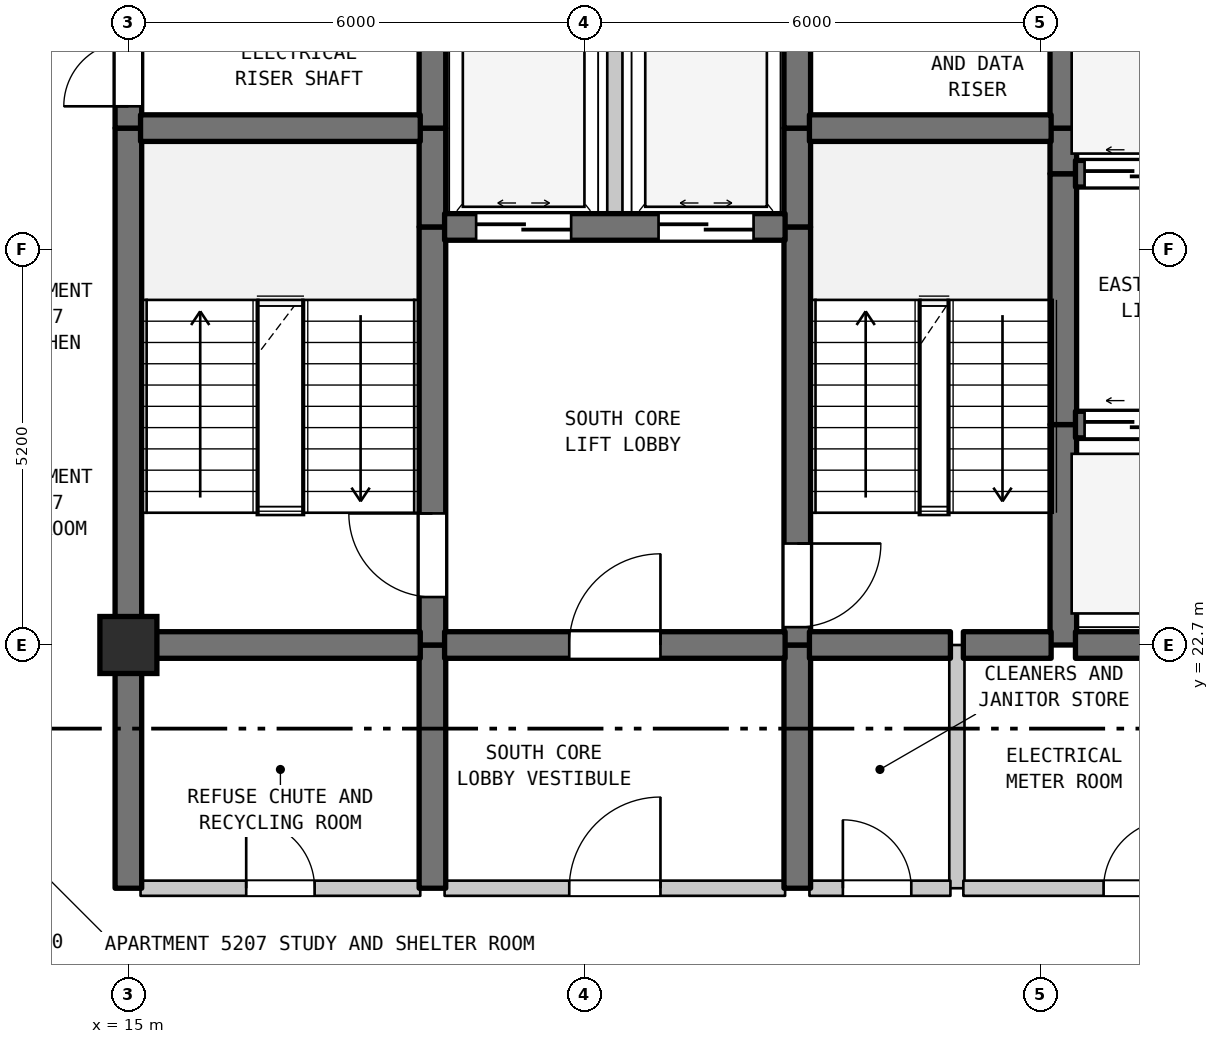
"""IFC4 building model, lengths in metres.
Left out: names, types, materials, properties, quantities, classifications, styles, units other than length and angle.
Written with IfcOpenShell. Run it as: python <this file> out.ifc"""

import sys

from ifc_helpers import new_model, si_unit, direction, frame, frame_2d, origin, origin_2d, place, context, subcontext, project, spatial, rectangle, extrude, element, fill, save


model = new_model("IFC4")
c1 = context("Model", 3, precision=1e-05, world=origin(), true_north=direction((0.0, 1.0)))
c2 = subcontext(c1, "Body", "Model", "MODEL_VIEW")
j1 = project(units=[si_unit("LENGTHUNIT", "METRE"), si_unit("PLANEANGLEUNIT", "RADIAN")], contexts=[c1])
p1 = place(None, origin())
s1 = spatial("IfcSite", under=j1, at=p1, CompositionType="ELEMENT")
p2 = place(p1, origin())
s2 = spatial("IfcBuilding", under=s1, at=p2, CompositionType="ELEMENT")
p3 = place(p2, frame((0.0, 0.0, 210.6)))
s3 = spatial("IfcBuildingStorey", under=s2, at=p3, CompositionType="ELEMENT", Elevation=210.6)
p4 = place(p3, frame((15.0, 22.7, 0.0), z_axis=(0.0, 0.0, 1.0), x_axis=(1.0, 0.0, 0.0)))
e1 = element("IfcColumn", 1, at=p4, inside=s3, PredefinedType="COLUMN", context=c2, shape_type="SweptSolid", body=[
    extrude(rectangle(XDim=0.75, YDim=0.75, at=origin_2d()), origin(), (0.0, 0.0, 1.0), 3.7),
])
p5 = place(p3, frame((15.0, 19.5, 0.0), z_axis=(0.0, 0.0, 1.0), x_axis=(0.0, 1.0, 0.0)))
e2 = element("IfcWall", 2, at=p5, inside=s3, PredefinedType="SHEAR", context=c2, shape_type="SweptSolid", body=[
    extrude(rectangle(XDim=3.2, YDim=0.35, at=frame_2d((1.6, 0.0))), origin(), (0.0, 0.0, 1.0), 3.39),
])
p6 = place(p3, frame((15.0, 22.7, 0.0), z_axis=(0.0, 0.0, 1.0), x_axis=(0.0, 1.0, 0.0)))
e3 = element("IfcWall", 3, at=p6, inside=s3, PredefinedType="SHEAR", context=c2, shape_type="SweptSolid", body=[
    extrude(rectangle(XDim=6.8, YDim=0.35, at=frame_2d((3.4, 0.0))), origin(), (0.0, 0.0, 1.0), 3.39),
])
p7 = place(p3, frame((15.0, 29.5, 0.0), z_axis=(0.0, 0.0, 1.0), x_axis=(0.0, 1.0, 0.0)))
e4 = element("IfcWall", 4, at=p7, inside=s3, PredefinedType="SHEAR", context=c2, shape_type="SweptSolid", body=[
    extrude(rectangle(XDim=1.6, YDim=0.35, at=frame_2d((0.8, 0.0))), origin(), (0.0, 0.0, 1.0), 3.39),
])
p8 = place(p7, frame((0.287, 0.0, 0.0)))
e5 = element("IfcOpeningElement", 5, at=p8, cuts=e4, PredefinedType="OPENING", context=c2, shape_type="SweptSolid", body=[
    extrude(rectangle(XDim=0.85, YDim=2.1, at=frame_2d((0.425, 1.05))), frame((0.0, 0.185, 0.0), z_axis=(0.0, -1.0, 0.0), x_axis=(1.0, 0.0, 0.0)), (0.0, 0.0, 1.0), 0.37),
])
p9 = place(p3, frame((19.0, 19.5, 0.0), z_axis=(0.0, 0.0, 1.0), x_axis=(0.0, 1.0, 0.0)))
e6 = element("IfcWall", 6, at=p9, inside=s3, PredefinedType="SHEAR", context=c2, shape_type="SweptSolid", body=[
    extrude(rectangle(XDim=3.2, YDim=0.35, at=frame_2d((1.6, 0.0))), origin(), (0.0, 0.0, 1.0), 3.39),
])
p10 = place(p3, frame((19.0, 22.7, 0.0), z_axis=(0.0, 0.0, 1.0), x_axis=(0.0, 1.0, 0.0)))
e7 = element("IfcWall", 7, at=p10, inside=s3, PredefinedType="SHEAR", context=c2, shape_type="SweptSolid", body=[
    extrude(rectangle(XDim=5.5, YDim=0.35, at=frame_2d((2.75, 0.0))), origin(), (0.0, 0.0, 1.0), 3.39),
])
p11 = place(p10, frame((0.631, 0.0, 0.0)))
e8 = element("IfcOpeningElement", 8, at=p11, cuts=e7, PredefinedType="OPENING", context=c2, shape_type="SweptSolid", body=[
    extrude(rectangle(XDim=1.1, YDim=2.15, at=frame_2d((0.55, 1.075))), frame((0.0, 0.185, 0.0), z_axis=(0.0, -1.0, 0.0), x_axis=(1.0, 0.0, 0.0)), (0.0, 0.0, 1.0), 0.37),
])
p12 = place(p3, frame((19.0, 28.2, 0.0), z_axis=(0.0, 0.0, 1.0), x_axis=(0.0, 1.0, 0.0)))
e9 = element("IfcWall", 9, at=p12, inside=s3, PredefinedType="SHEAR", context=c2, shape_type="SweptSolid", body=[
    extrude(rectangle(XDim=1.3, YDim=0.35, at=frame_2d((0.65, 0.0))), origin(), (0.0, 0.0, 1.0), 3.39),
])
p13 = place(p3, frame((19.0, 29.5, 0.0), z_axis=(0.0, 0.0, 1.0), x_axis=(0.0, 1.0, 0.0)))
e10 = element("IfcWall", 10, at=p13, inside=s3, PredefinedType="SHEAR", context=c2, shape_type="SweptSolid", body=[
    extrude(rectangle(XDim=5.5, YDim=0.35, at=frame_2d((2.75, 0.0))), origin(), (0.0, 0.0, 1.0), 3.39),
])
p14 = place(p13, frame((2.025, 0.0, 0.0)))
e11 = element("IfcOpeningElement", 11, at=p14, cuts=e10, PredefinedType="OPENING", context=c2, shape_type="SweptSolid", body=[
    extrude(rectangle(XDim=1.1, YDim=2.15, at=frame_2d((0.55, 1.075))), frame((0.0, 0.185, 0.0), z_axis=(0.0, -1.0, 0.0), x_axis=(1.0, 0.0, 0.0)), (0.0, 0.0, 1.0), 0.37),
])
p15 = place(p3, frame((21.4, 28.2, 0.0), z_axis=(0.0, 0.0, 1.0), x_axis=(0.0, 1.0, 0.0)))
e12 = element("IfcWall", 12, at=p15, inside=s3, PredefinedType="STANDARD", context=c2, shape_type="SweptSolid", body=[
    extrude(rectangle(XDim=2.6, YDim=0.2, at=frame_2d((1.3, 0.0))), origin(), (0.0, 0.0, 1.0), 3.39),
])
p16 = place(p3, frame((23.8, 19.5, 0.0), z_axis=(0.0, 0.0, 1.0), x_axis=(0.0, 1.0, 0.0)))
e13 = element("IfcWall", 13, at=p16, inside=s3, PredefinedType="SHEAR", context=c2, shape_type="SweptSolid", body=[
    extrude(rectangle(XDim=3.2, YDim=0.35, at=frame_2d((1.6, 0.0))), origin(), (0.0, 0.0, 1.0), 3.39),
])
p17 = place(p3, frame((23.8, 22.7, 0.0), z_axis=(0.0, 0.0, 1.0), x_axis=(0.0, 1.0, 0.0)))
e14 = element("IfcWall", 14, at=p17, inside=s3, PredefinedType="SHEAR", context=c2, shape_type="SweptSolid", body=[
    extrude(rectangle(XDim=5.5, YDim=0.35, at=frame_2d((2.75, 0.0))), origin(), (0.0, 0.0, 1.0), 3.39),
])
p18 = place(p17, frame((0.235, 0.0, 0.0)))
e15 = element("IfcOpeningElement", 15, at=p18, cuts=e14, PredefinedType="OPENING", context=c2, shape_type="SweptSolid", body=[
    extrude(rectangle(XDim=1.1, YDim=2.15, at=frame_2d((0.55, 1.075))), frame((0.0, 0.185, 0.0), z_axis=(0.0, -1.0, 0.0), x_axis=(1.0, 0.0, 0.0)), (0.0, 0.0, 1.0), 0.37),
])
for number, where, z_axis, x_axis in (
    (16, (23.8, 28.2, 0.0), (0.0, 0.0, 1.0), (0.0, 1.0, 0.0)),
    (17, (23.8, 29.5, 0.0), (0.0, 0.0, 1.0), (0.0, 1.0, 0.0)),
):
    element("IfcWall", number, at=place(p3, frame(where, z_axis=z_axis, x_axis=x_axis)), inside=s3, PredefinedType="SHEAR", context=c2, shape_type="SweptSolid", body=[
        extrude(rectangle(XDim=1.3, YDim=0.35, at=frame_2d((0.65, 0.0))), origin(), (0.0, 0.0, 1.0), 3.39),
    ])
p19 = place(p3, frame((25.9, 19.5, 0.0), z_axis=(0.0, 0.0, 1.0), x_axis=(0.0, 1.0, 0.0)))
e18 = element("IfcWall", 18, at=p19, inside=s3, PredefinedType="STANDARD", context=c2, shape_type="SweptSolid", body=[
    extrude(rectangle(XDim=3.2, YDim=0.2, at=frame_2d((1.6, 0.0))), origin(), (0.0, 0.0, 1.0), 3.39),
])
p20 = place(p3, frame((27.3, 22.7, 0.0), z_axis=(0.0, 0.0, 1.0), x_axis=(0.0, 1.0, 0.0)))
e19 = element("IfcWall", 19, at=p20, inside=s3, PredefinedType="SHEAR", context=c2, shape_type="SweptSolid", body=[
    extrude(rectangle(XDim=2.9, YDim=0.35, at=frame_2d((1.45, 0.0))), origin(), (0.0, 0.0, 1.0), 3.39),
])
p21 = place(p3, frame((27.3, 25.6, 0.0), z_axis=(0.0, 0.0, 1.0), x_axis=(0.0, 1.0, 0.0)))
e20 = element("IfcWall", 20, at=p21, inside=s3, PredefinedType="SHEAR", context=c2, shape_type="SweptSolid", body=[
    extrude(rectangle(XDim=3.3, YDim=0.35, at=frame_2d((1.65, 0.0))), origin(), (0.0, 0.0, 1.0), 3.39),
])
p22 = place(p3, frame((27.3, 28.9, 0.0), z_axis=(0.0, 0.0, 1.0), x_axis=(0.0, 1.0, 0.0)))
e21 = element("IfcWall", 21, at=p22, inside=s3, PredefinedType="SHEAR", context=c2, shape_type="SweptSolid", body=[
    extrude(rectangle(XDim=0.6, YDim=0.35, at=frame_2d((0.3, 0.0))), origin(), (0.0, 0.0, 1.0), 3.39),
])
p23 = place(p3, frame((27.3, 29.5, 0.0), z_axis=(0.0, 0.0, 1.0), x_axis=(0.0, 1.0, 0.0)))
e22 = element("IfcWall", 22, at=p23, inside=s3, PredefinedType="SHEAR", context=c2, shape_type="SweptSolid", body=[
    extrude(rectangle(XDim=2.0, YDim=0.35, at=frame_2d((1.0, 0.0))), origin(), (0.0, 0.0, 1.0), 3.39),
])
p24 = place(p3, frame((15.16, 19.5, 0.0), z_axis=(0.0, 0.0, 1.0), x_axis=(1.0, 0.0, 0.0)))
e23 = element("IfcWall", 23, at=p24, inside=s3, PredefinedType="STANDARD", context=c2, shape_type="SweptSolid", body=[
    extrude(rectangle(XDim=3.68, YDim=0.2, at=frame_2d((1.84, 0.0))), origin(), (0.0, 0.0, 1.0), 3.39),
])
p25 = place(p24, frame((1.39, 0.0, 0.0)))
e24 = element("IfcOpeningElement", 24, at=p25, cuts=e23, PredefinedType="OPENING", context=c2, shape_type="SweptSolid", body=[
    extrude(rectangle(XDim=0.9, YDim=2.15, at=frame_2d((0.45, 1.075))), frame((0.0, 0.11, 0.0), z_axis=(0.0, -1.0, 0.0), x_axis=(1.0, 0.0, 0.0)), (0.0, 0.0, 1.0), 0.22),
])
p26 = place(p3, frame((19.16, 19.5, 0.0), z_axis=(0.0, 0.0, 1.0), x_axis=(1.0, 0.0, 0.0)))
e25 = element("IfcWall", 25, at=p26, inside=s3, PredefinedType="STANDARD", context=c2, shape_type="SweptSolid", body=[
    extrude(rectangle(XDim=4.48, YDim=0.2, at=frame_2d((2.24, 0.0))), origin(), (0.0, 0.0, 1.0), 3.39),
])
p27 = place(p26, frame((1.64, 0.0, 0.0)))
e26 = element("IfcOpeningElement", 26, at=p27, cuts=e25, PredefinedType="OPENING", context=c2, shape_type="SweptSolid", body=[
    extrude(rectangle(XDim=1.2, YDim=2.2, at=frame_2d((0.6, 1.1))), frame((0.0, 0.11, 0.0), z_axis=(0.0, -1.0, 0.0), x_axis=(1.0, 0.0, 0.0)), (0.0, 0.0, 1.0), 0.22),
])
p28 = place(p3, frame((23.96, 19.5, 0.0), z_axis=(0.0, 0.0, 1.0), x_axis=(1.0, 0.0, 0.0)))
e27 = element("IfcWall", 27, at=p28, inside=s3, PredefinedType="STANDARD", context=c2, shape_type="SweptSolid", body=[
    extrude(rectangle(XDim=1.855, YDim=0.2, at=frame_2d((0.927, 0.0))), origin(), (0.0, 0.0, 1.0), 3.39),
])
p29 = place(p28, frame((0.44, 0.0, 0.0)))
e28 = element("IfcOpeningElement", 28, at=p29, cuts=e27, PredefinedType="OPENING", context=c2, shape_type="SweptSolid", body=[
    extrude(rectangle(XDim=0.9, YDim=2.15, at=frame_2d((0.45, 1.075))), frame((0.0, 0.11, 0.0), z_axis=(0.0, -1.0, 0.0), x_axis=(1.0, 0.0, 0.0)), (0.0, 0.0, 1.0), 0.22),
])
p30 = place(p3, frame((25.985, 19.5, 0.0), z_axis=(0.0, 0.0, 1.0), x_axis=(1.0, 0.0, 0.0)))
e29 = element("IfcWall", 29, at=p30, inside=s3, PredefinedType="STANDARD", context=c2, shape_type="SweptSolid", body=[
    extrude(rectangle(XDim=4.655, YDim=0.2, at=frame_2d((2.327, 0.0))), origin(), (0.0, 0.0, 1.0), 3.39),
])
p31 = place(p30, frame((1.845, 0.0, 0.0)))
e30 = element("IfcOpeningElement", 30, at=p31, cuts=e29, PredefinedType="OPENING", context=c2, shape_type="SweptSolid", body=[
    extrude(rectangle(XDim=0.9, YDim=2.15, at=frame_2d((0.45, 1.075))), frame((0.0, 0.11, 0.0), z_axis=(0.0, -1.0, 0.0), x_axis=(1.0, 0.0, 0.0)), (0.0, 0.0, 1.0), 0.22),
])
p32 = place(p3, frame((15.16, 22.7, 0.0), z_axis=(0.0, 0.0, 1.0), x_axis=(1.0, 0.0, 0.0)))
e31 = element("IfcWall", 31, at=p32, inside=s3, PredefinedType="SHEAR", context=c2, shape_type="SweptSolid", body=[
    extrude(rectangle(XDim=3.68, YDim=0.35, at=frame_2d((1.84, 0.0))), origin(), (0.0, 0.0, 1.0), 3.39),
])
p33 = place(p3, frame((19.16, 22.7, 0.0), z_axis=(0.0, 0.0, 1.0), x_axis=(1.0, 0.0, 0.0)))
e32 = element("IfcWall", 32, at=p33, inside=s3, PredefinedType="SHEAR", context=c2, shape_type="SweptSolid", body=[
    extrude(rectangle(XDim=4.48, YDim=0.35, at=frame_2d((2.24, 0.0))), origin(), (0.0, 0.0, 1.0), 3.39),
])
p34 = place(p33, frame((1.64, 0.0, 0.0)))
e33 = element("IfcOpeningElement", 33, at=p34, cuts=e32, PredefinedType="OPENING", context=c2, shape_type="SweptSolid", body=[
    extrude(rectangle(XDim=1.2, YDim=2.2, at=frame_2d((0.6, 1.1))), frame((0.0, 0.185, 0.0), z_axis=(0.0, -1.0, 0.0), x_axis=(1.0, 0.0, 0.0)), (0.0, 0.0, 1.0), 0.37),
])
p35 = place(p3, frame((23.96, 22.7, 0.0), z_axis=(0.0, 0.0, 1.0), x_axis=(1.0, 0.0, 0.0)))
e34 = element("IfcWall", 34, at=p35, inside=s3, PredefinedType="SHEAR", context=c2, shape_type="SweptSolid", body=[
    extrude(rectangle(XDim=1.855, YDim=0.35, at=frame_2d((0.927, 0.0))), origin(), (0.0, 0.0, 1.0), 3.39),
])
p36 = place(p3, frame((25.985, 22.7, 0.0), z_axis=(0.0, 0.0, 1.0), x_axis=(1.0, 0.0, 0.0)))
e35 = element("IfcWall", 35, at=p36, inside=s3, PredefinedType="SHEAR", context=c2, shape_type="SweptSolid", body=[
    extrude(rectangle(XDim=1.155, YDim=0.35, at=frame_2d((0.577, 0.0))), origin(), (0.0, 0.0, 1.0), 3.39),
])
p37 = place(p3, frame((27.46, 22.7, 0.0), z_axis=(0.0, 0.0, 1.0), x_axis=(1.0, 0.0, 0.0)))
e36 = element("IfcWall", 36, at=p37, inside=s3, PredefinedType="SHEAR", context=c2, shape_type="SweptSolid", body=[
    extrude(rectangle(XDim=3.18, YDim=0.35, at=frame_2d((1.59, 0.0))), origin(), (0.0, 0.0, 1.0), 3.39),
])
p38 = place(p3, frame((27.46, 25.6, 0.0), z_axis=(0.0, 0.0, 1.0), x_axis=(1.0, 0.0, 0.0)))
e37 = element("IfcWall", 37, at=p38, inside=s3, PredefinedType="SHEAR", context=c2, shape_type="SweptSolid", body=[
    extrude(rectangle(XDim=3.18, YDim=0.35, at=frame_2d((1.59, 0.0))), origin(), (0.0, 0.0, 1.0), 3.39),
])
p39 = place(p38, frame((0.12, 0.0, 0.0)))
e38 = element("IfcOpeningElement", 38, at=p39, cuts=e37, PredefinedType="OPENING", context=c2, shape_type="SweptSolid", body=[
    extrude(rectangle(XDim=1.25, YDim=2.2, at=frame_2d((0.625, 1.1))), frame((0.0, 0.185, 0.0), z_axis=(0.0, -1.0, 0.0), x_axis=(1.0, 0.0, 0.0)), (0.0, 0.0, 1.0), 0.37),
])
p40 = place(p38, frame((1.81, 0.0, 0.0)))
e39 = element("IfcOpeningElement", 39, at=p40, cuts=e37, PredefinedType="OPENING", context=c2, shape_type="SweptSolid", body=[
    extrude(rectangle(XDim=1.25, YDim=2.2, at=frame_2d((0.625, 1.1))), frame((0.0, 0.185, 0.0), z_axis=(0.0, -1.0, 0.0), x_axis=(1.0, 0.0, 0.0)), (0.0, 0.0, 1.0), 0.37),
])
p41 = place(p3, frame((19.16, 28.2, 0.0), z_axis=(0.0, 0.0, 1.0), x_axis=(1.0, 0.0, 0.0)))
e40 = element("IfcWall", 40, at=p41, inside=s3, PredefinedType="SHEAR", context=c2, shape_type="SweptSolid", body=[
    extrude(rectangle(XDim=4.48, YDim=0.35, at=frame_2d((2.24, 0.0))), origin(), (0.0, 0.0, 1.0), 3.39),
])
p42 = place(p41, frame((0.415, 0.0, 0.0)))
e41 = element("IfcOpeningElement", 41, at=p42, cuts=e40, PredefinedType="OPENING", context=c2, shape_type="SweptSolid", body=[
    extrude(rectangle(XDim=1.25, YDim=2.2, at=frame_2d((0.625, 1.1))), frame((0.0, 0.185, 0.0), z_axis=(0.0, -1.0, 0.0), x_axis=(1.0, 0.0, 0.0)), (0.0, 0.0, 1.0), 0.37),
])
p43 = place(p41, frame((2.815, 0.0, 0.0)))
e42 = element("IfcOpeningElement", 42, at=p43, cuts=e40, PredefinedType="OPENING", context=c2, shape_type="SweptSolid", body=[
    extrude(rectangle(XDim=1.25, YDim=2.2, at=frame_2d((0.625, 1.1))), frame((0.0, 0.185, 0.0), z_axis=(0.0, -1.0, 0.0), x_axis=(1.0, 0.0, 0.0)), (0.0, 0.0, 1.0), 0.37),
])
p44 = place(p3, frame((27.46, 28.9, 0.0), z_axis=(0.0, 0.0, 1.0), x_axis=(1.0, 0.0, 0.0)))
e43 = element("IfcWall", 43, at=p44, inside=s3, PredefinedType="SHEAR", context=c2, shape_type="SweptSolid", body=[
    extrude(rectangle(XDim=3.18, YDim=0.35, at=frame_2d((1.59, 0.0))), origin(), (0.0, 0.0, 1.0), 3.39),
])
p45 = place(p44, frame((0.12, 0.0, 0.0)))
e44 = element("IfcOpeningElement", 44, at=p45, cuts=e43, PredefinedType="OPENING", context=c2, shape_type="SweptSolid", body=[
    extrude(rectangle(XDim=1.25, YDim=2.2, at=frame_2d((0.625, 1.1))), frame((0.0, 0.185, 0.0), z_axis=(0.0, -1.0, 0.0), x_axis=(1.0, 0.0, 0.0)), (0.0, 0.0, 1.0), 0.37),
])
p46 = place(p44, frame((1.81, 0.0, 0.0)))
e45 = element("IfcOpeningElement", 45, at=p46, cuts=e43, PredefinedType="OPENING", context=c2, shape_type="SweptSolid", body=[
    extrude(rectangle(XDim=1.25, YDim=2.2, at=frame_2d((0.625, 1.1))), frame((0.0, 0.185, 0.0), z_axis=(0.0, -1.0, 0.0), x_axis=(1.0, 0.0, 0.0)), (0.0, 0.0, 1.0), 0.37),
])
p47 = place(p3, frame((15.16, 29.5, 0.0), z_axis=(0.0, 0.0, 1.0), x_axis=(1.0, 0.0, 0.0)))
e46 = element("IfcWall", 46, at=p47, inside=s3, PredefinedType="SHEAR", context=c2, shape_type="SweptSolid", body=[
    extrude(rectangle(XDim=3.68, YDim=0.35, at=frame_2d((1.84, 0.0))), origin(), (0.0, 0.0, 1.0), 3.39),
])
p48 = place(p3, frame((23.96, 29.5, 0.0), z_axis=(0.0, 0.0, 1.0), x_axis=(1.0, 0.0, 0.0)))
e47 = element("IfcWall", 47, at=p48, inside=s3, PredefinedType="SHEAR", context=c2, shape_type="SweptSolid", body=[
    extrude(rectangle(XDim=3.18, YDim=0.35, at=frame_2d((1.59, 0.0))), origin(), (0.0, 0.0, 1.0), 3.39),
])
p49 = place(p8, origin())
e48 = element("IfcDoor", 48, at=p49, inside=s3, OperationType="SINGLE_SWING_LEFT", PredefinedType="DOOR", context=c2, shape_type="SweptSolid", body=[
    extrude(rectangle(XDim=0.85, YDim=2.1, at=frame_2d((0.425, 1.05))), frame((0.0, 0.025, 0.0), z_axis=(0.0, -1.0, 0.0), x_axis=(1.0, 0.0, 0.0)), (0.0, 0.0, 1.0), 0.05),
])
fill(e5, e48)
p50 = place(p11, origin())
e49 = element("IfcDoor", 49, at=p50, inside=s3, OperationType="SINGLE_SWING_RIGHT", PredefinedType="DOOR", context=c2, shape_type="SweptSolid", body=[
    extrude(rectangle(XDim=1.1, YDim=2.15, at=frame_2d((0.55, 1.075))), frame((0.0, 0.025, 0.0), z_axis=(0.0, -1.0, 0.0), x_axis=(1.0, 0.0, 0.0)), (0.0, 0.0, 1.0), 0.05),
])
fill(e8, e49)
p51 = place(p18, frame((1.1, 0.0, 0.0), z_axis=(0.0, 0.0, 1.0), x_axis=(-1.0, 0.0, 0.0)))
e50 = element("IfcDoor", 50, at=p51, inside=s3, OperationType="SINGLE_SWING_RIGHT", PredefinedType="DOOR", context=c2, shape_type="SweptSolid", body=[
    extrude(rectangle(XDim=1.1, YDim=2.15, at=frame_2d((0.55, 1.075))), frame((0.0, 0.025, 0.0), z_axis=(0.0, -1.0, 0.0), x_axis=(1.0, 0.0, 0.0)), (0.0, 0.0, 1.0), 0.05),
])
fill(e15, e50)
p52 = place(p25, origin())
e51 = element("IfcDoor", 51, at=p52, inside=s3, OperationType="SINGLE_SWING_LEFT", PredefinedType="DOOR", context=c2, shape_type="SweptSolid", body=[
    extrude(rectangle(XDim=0.9, YDim=2.15, at=frame_2d((0.45, 1.075))), frame((0.0, 0.025, 0.0), z_axis=(0.0, -1.0, 0.0), x_axis=(1.0, 0.0, 0.0)), (0.0, 0.0, 1.0), 0.05),
])
fill(e24, e51)
p53 = place(p27, origin())
e52 = element("IfcDoor", 52, at=p53, inside=s3, OperationType="SINGLE_SWING_RIGHT", PredefinedType="DOOR", context=c2, shape_type="SweptSolid", body=[
    extrude(rectangle(XDim=1.2, YDim=2.2, at=frame_2d((0.6, 1.1))), frame((0.0, 0.025, 0.0), z_axis=(0.0, -1.0, 0.0), x_axis=(1.0, 0.0, 0.0)), (0.0, 0.0, 1.0), 0.05),
])
fill(e26, e52)
p54 = place(p29, origin())
e53 = element("IfcDoor", 53, at=p54, inside=s3, OperationType="SINGLE_SWING_LEFT", PredefinedType="DOOR", context=c2, shape_type="SweptSolid", body=[
    extrude(rectangle(XDim=0.9, YDim=2.15, at=frame_2d((0.45, 1.075))), frame((0.0, 0.025, 0.0), z_axis=(0.0, -1.0, 0.0), x_axis=(1.0, 0.0, 0.0)), (0.0, 0.0, 1.0), 0.05),
])
fill(e28, e53)
p55 = place(p31, origin())
e54 = element("IfcDoor", 54, at=p55, inside=s3, OperationType="SINGLE_SWING_RIGHT", PredefinedType="DOOR", context=c2, shape_type="SweptSolid", body=[
    extrude(rectangle(XDim=0.9, YDim=2.15, at=frame_2d((0.45, 1.075))), frame((0.0, 0.025, 0.0), z_axis=(0.0, -1.0, 0.0), x_axis=(1.0, 0.0, 0.0)), (0.0, 0.0, 1.0), 0.05),
])
fill(e30, e54)
p56 = place(p34, origin())
e55 = element("IfcDoor", 55, at=p56, inside=s3, OperationType="SINGLE_SWING_RIGHT", PredefinedType="DOOR", context=c2, shape_type="SweptSolid", body=[
    extrude(rectangle(XDim=1.2, YDim=2.2, at=frame_2d((0.6, 1.1))), frame((0.0, 0.025, 0.0), z_axis=(0.0, -1.0, 0.0), x_axis=(1.0, 0.0, 0.0)), (0.0, 0.0, 1.0), 0.05),
])
fill(e33, e55)
p57 = place(p39, origin())
e56 = element("IfcDoor", 56, at=p57, inside=s3, OperationType="DOUBLE_DOOR_SLIDING", PredefinedType="DOOR", context=c2, shape_type="SweptSolid", body=[
    extrude(rectangle(XDim=1.25, YDim=2.2, at=frame_2d((0.625, 1.1))), frame((0.0, 0.025, 0.0), z_axis=(0.0, -1.0, 0.0), x_axis=(1.0, 0.0, 0.0)), (0.0, 0.0, 1.0), 0.05),
])
fill(e38, e56)
p58 = place(p42, origin())
e57 = element("IfcDoor", 57, at=p58, inside=s3, OperationType="DOUBLE_DOOR_SLIDING", PredefinedType="DOOR", context=c2, shape_type="SweptSolid", body=[
    extrude(rectangle(XDim=1.25, YDim=2.2, at=frame_2d((0.625, 1.1))), frame((0.0, 0.025, 0.0), z_axis=(0.0, -1.0, 0.0), x_axis=(1.0, 0.0, 0.0)), (0.0, 0.0, 1.0), 0.05),
])
fill(e41, e57)
p59 = place(p43, origin())
e58 = element("IfcDoor", 58, at=p59, inside=s3, OperationType="DOUBLE_DOOR_SLIDING", PredefinedType="DOOR", context=c2, shape_type="SweptSolid", body=[
    extrude(rectangle(XDim=1.25, YDim=2.2, at=frame_2d((0.625, 1.1))), frame((0.0, 0.025, 0.0), z_axis=(0.0, -1.0, 0.0), x_axis=(1.0, 0.0, 0.0)), (0.0, 0.0, 1.0), 0.05),
])
fill(e42, e58)
p60 = place(p45, origin())
e59 = element("IfcDoor", 59, at=p60, inside=s3, OperationType="DOUBLE_DOOR_SLIDING", PredefinedType="DOOR", context=c2, shape_type="SweptSolid", body=[
    extrude(rectangle(XDim=1.25, YDim=2.2, at=frame_2d((0.625, 1.1))), frame((0.0, 0.025, 0.0), z_axis=(0.0, -1.0, 0.0), x_axis=(1.0, 0.0, 0.0)), (0.0, 0.0, 1.0), 0.05),
])
fill(e44, e59)
save(model, sys.argv[1])
